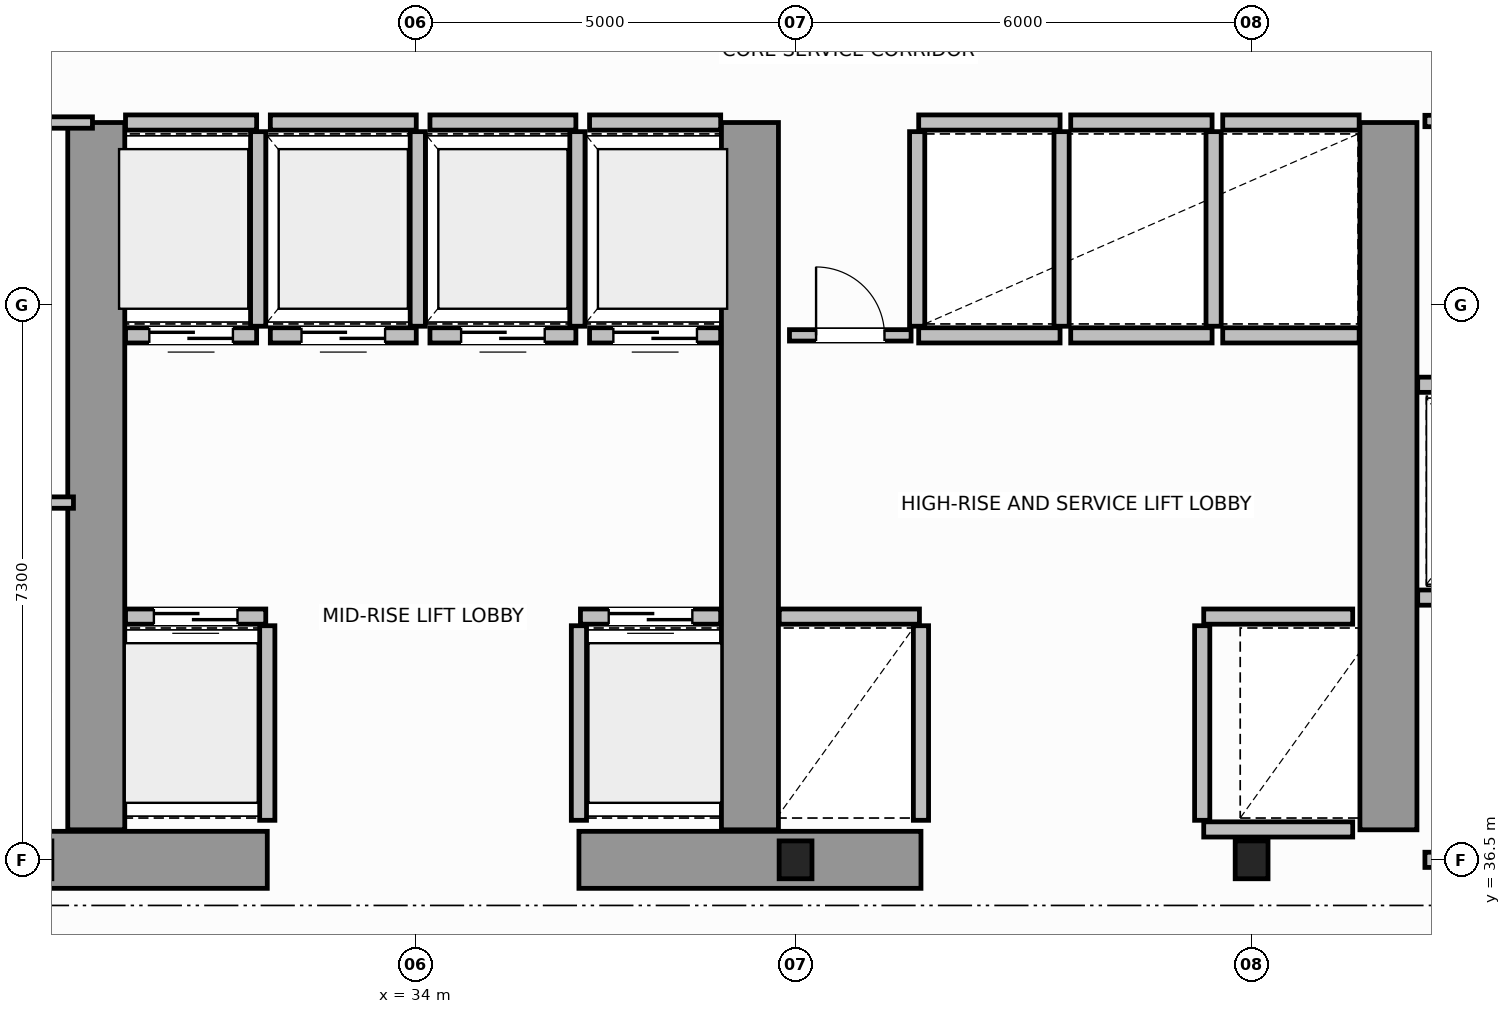
"""IFC4 building model, lengths in metres.
Left out: names, types, materials, properties, quantities, classifications, styles, units other than length and angle.
Written with IfcOpenShell. Run it as: python <this file> out.ifc"""

import sys

from ifc_helpers import new_model, si_unit, direction, frame, frame_2d, origin, origin_2d, place, context, subcontext, project, spatial, rectangle, i_section, extrude, source, transform, mapped, element, fill, save


model = new_model("IFC4")
c1 = context("Model", 3, precision=1e-05, world=origin(), true_north=direction((0.0, 1.0)))
c2 = subcontext(c1, "Body", "Model", "MODEL_VIEW")
j1 = project(units=[si_unit("LENGTHUNIT", "METRE"), si_unit("PLANEANGLEUNIT", "RADIAN")], contexts=[c1])
p1 = place(None, origin())
s1 = spatial("IfcSite", under=j1, at=p1, CompositionType="ELEMENT")
p2 = place(p1, origin())
s2 = spatial("IfcBuilding", under=s1, at=p2, CompositionType="ELEMENT")
p3 = place(p2, frame((0.0, 0.0, 165.2)))
s3 = spatial("IfcBuildingStorey", under=s2, at=p3, CompositionType="ELEMENT", Elevation=165.2)
m1 = source(origin(), c2, "Body", "SweptSolid", [
    extrude(i_section(OverallWidth=0.432, OverallDepth=0.498, WebThickness=0.055, FlangeThickness=0.068, FilletRadius=0.015, at=origin_2d()), origin(), (0.0, 0.0, 1.0), 3.8),
])
for number, where, z_axis, x_axis in (
    (1, (39.0, 36.5, 0.0), (0.0, 0.0, 1.0), (1.0, 0.0, 0.0)),
    (2, (45.0, 36.5, 0.0), (0.0, 0.0, 1.0), (1.0, 0.0, 0.0)),
):
    element("IfcColumn", number, at=place(p3, frame(where, z_axis=z_axis, x_axis=x_axis)), inside=s3, PredefinedType="COLUMN", context=c2, shape_type="MappedRepresentation", body=[
        mapped(m1, transform((0.0, 0.0, 0.0), scale=1.0)),
    ])
for number, where, z_axis, x_axis in (
    (3, (27.55, 36.5, 0.0), (0.0, 0.0, 1.0), (1.0, 0.0, 0.0)),
    (4, (36.15, 36.5, 0.0), (0.0, 0.0, 1.0), (1.0, 0.0, 0.0)),
):
    element("IfcWall", number, at=place(p3, frame(where, z_axis=z_axis, x_axis=x_axis)), inside=s3, PredefinedType="SHEAR", context=c2, shape_type="SweptSolid", body=[
        extrude(rectangle(XDim=4.5, YDim=0.75, at=frame_2d((2.25, 0.0))), origin(), (0.0, 0.0, 1.0), 3.8),
    ])
for number, where, z_axis, x_axis in (
    (5, (29.8, 36.895, 0.0), (0.0, 0.0, 1.0), (0.0, 1.0, 0.0)),
    (6, (38.4, 36.895, 0.0), (0.0, 0.0, 1.0), (0.0, 1.0, 0.0)),
    (7, (46.8, 36.895, 0.0), (0.0, 0.0, 1.0), (0.0, 1.0, 0.0)),
):
    element("IfcWall", number, at=place(p3, frame(where, z_axis=z_axis, x_axis=x_axis)), inside=s3, PredefinedType="SHEAR", context=c2, shape_type="SweptSolid", body=[
        extrude(rectangle(XDim=9.305, YDim=0.75, at=frame_2d((4.652, 0.0))), origin(), (0.0, 0.0, 1.0), 3.8),
    ])
p4 = place(p3, frame((47.28, 36.5, 0.0), z_axis=(0.0, 0.0, 1.0), x_axis=(1.0, 0.0, 0.0)))
e8 = element("IfcWall", 8, at=p4, inside=s3, PredefinedType="SOLIDWALL", context=c2, shape_type="SweptSolid", body=[
    extrude(rectangle(XDim=2.47, YDim=0.2, at=frame_2d((1.235, 0.0))), origin(), (0.0, 0.0, 1.0), 2.37),
])
p5 = place(p4, frame((0.65, 0.0, 0.0)))
e9 = element("IfcOpeningElement", 9, at=p5, cuts=e8, PredefinedType="OPENING", context=c2, shape_type="SweptSolid", body=[
    extrude(rectangle(XDim=1.1, YDim=2.15, at=frame_2d((0.55, 1.075))), frame((0.0, 0.11, 0.0), z_axis=(0.0, -1.0, 0.0), x_axis=(1.0, 0.0, 0.0)), (0.0, 0.0, 1.0), 0.22),
])
p6 = place(p3, frame((30.185, 39.7, 0.0), z_axis=(0.0, 0.0, 1.0), x_axis=(1.0, 0.0, 0.0)))
e10 = element("IfcWall", 10, at=p6, inside=s3, PredefinedType="SOLIDWALL", context=c2, shape_type="SweptSolid", body=[
    extrude(rectangle(XDim=1.845, YDim=0.2, at=frame_2d((0.922, 0.0))), origin(), (0.0, 0.0, 1.0), 3.58),
])
p7 = place(p6, frame((0.373, 0.0, 0.0)))
e11 = element("IfcOpeningElement", 11, at=p7, cuts=e10, PredefinedType="OPENING", context=c2, shape_type="SweptSolid", body=[
    extrude(rectangle(XDim=1.1, YDim=2.15, at=frame_2d((0.55, 1.075))), frame((0.0, 0.11, 0.0), z_axis=(0.0, -1.0, 0.0), x_axis=(1.0, 0.0, 0.0)), (0.0, 0.0, 1.0), 0.22),
])
p8 = place(p3, frame((32.05, 37.02, 0.0), z_axis=(0.0, 0.0, 1.0), x_axis=(0.0, 1.0, 0.0)))
e12 = element("IfcWall", 12, at=p8, inside=s3, PredefinedType="SOLIDWALL", context=c2, shape_type="SweptSolid", body=[
    extrude(rectangle(XDim=2.56, YDim=0.2, at=frame_2d((1.28, 0.0))), origin(), (0.0, 0.0, 1.0), 3.58),
])
p9 = place(p3, frame((36.17, 39.7, 0.0), z_axis=(0.0, 0.0, 1.0), x_axis=(1.0, 0.0, 0.0)))
e13 = element("IfcWall", 13, at=p9, inside=s3, PredefinedType="SOLIDWALL", context=c2, shape_type="SweptSolid", body=[
    extrude(rectangle(XDim=1.845, YDim=0.2, at=frame_2d((0.922, 0.0))), origin(), (0.0, 0.0, 1.0), 3.58),
])
p10 = place(p9, frame((0.372, 0.0, 0.0)))
e14 = element("IfcOpeningElement", 14, at=p10, cuts=e13, PredefinedType="OPENING", context=c2, shape_type="SweptSolid", body=[
    extrude(rectangle(XDim=1.1, YDim=2.15, at=frame_2d((0.55, 1.075))), frame((0.0, 0.11, 0.0), z_axis=(0.0, -1.0, 0.0), x_axis=(1.0, 0.0, 0.0)), (0.0, 0.0, 1.0), 0.22),
])
p11 = place(p3, frame((36.15, 37.02, 0.0), z_axis=(0.0, 0.0, 1.0), x_axis=(0.0, 1.0, 0.0)))
e15 = element("IfcWall", 15, at=p11, inside=s3, PredefinedType="SOLIDWALL", context=c2, shape_type="SweptSolid", body=[
    extrude(rectangle(XDim=2.56, YDim=0.2, at=frame_2d((1.28, 0.0))), origin(), (0.0, 0.0, 1.0), 3.58),
])
p12 = place(p3, frame((30.185, 43.4, 0.0), z_axis=(0.0, 0.0, 1.0), x_axis=(1.0, 0.0, 0.0)))
e16 = element("IfcWall", 16, at=p12, inside=s3, PredefinedType="SOLIDWALL", context=c2, shape_type="SweptSolid", body=[
    extrude(rectangle(XDim=1.725, YDim=0.2, at=frame_2d((0.862, 0.0))), origin(), (0.0, 0.0, 1.0), 3.58),
])
p13 = place(p12, frame((0.313, 0.0, 0.0)))
e17 = element("IfcOpeningElement", 17, at=p13, cuts=e16, PredefinedType="OPENING", context=c2, shape_type="SweptSolid", body=[
    extrude(rectangle(XDim=1.1, YDim=2.15, at=frame_2d((0.55, 1.075))), frame((0.0, 0.11, 0.0), z_axis=(0.0, -1.0, 0.0), x_axis=(1.0, 0.0, 0.0)), (0.0, 0.0, 1.0), 0.22),
])
p14 = place(p3, frame((30.185, 46.2, 0.0), z_axis=(0.0, 0.0, 1.0), x_axis=(1.0, 0.0, 0.0)))
e18 = element("IfcWall", 18, at=p14, inside=s3, PredefinedType="SOLIDWALL", context=c2, shape_type="SweptSolid", body=[
    extrude(rectangle(XDim=1.725, YDim=0.2, at=frame_2d((0.862, 0.0))), origin(), (0.0, 0.0, 1.0), 3.58),
])
p15 = place(p3, frame((31.93, 43.52, 0.0), z_axis=(0.0, 0.0, 1.0), x_axis=(0.0, 1.0, 0.0)))
e19 = element("IfcWall", 19, at=p15, inside=s3, PredefinedType="SOLIDWALL", context=c2, shape_type="SweptSolid", body=[
    extrude(rectangle(XDim=2.56, YDim=0.2, at=frame_2d((1.28, 0.0))), origin(), (0.0, 0.0, 1.0), 3.58),
])
p16 = place(p3, frame((32.09, 43.4, 0.0), z_axis=(0.0, 0.0, 1.0), x_axis=(1.0, 0.0, 0.0)))
e20 = element("IfcWall", 20, at=p16, inside=s3, PredefinedType="SOLIDWALL", context=c2, shape_type="SweptSolid", body=[
    extrude(rectangle(XDim=1.92, YDim=0.2, at=frame_2d((0.96, 0.0))), origin(), (0.0, 0.0, 1.0), 3.58),
])
p17 = place(p16, frame((0.41, 0.0, 0.0)))
e21 = element("IfcOpeningElement", 21, at=p17, cuts=e20, PredefinedType="OPENING", context=c2, shape_type="SweptSolid", body=[
    extrude(rectangle(XDim=1.1, YDim=2.15, at=frame_2d((0.55, 1.075))), frame((0.0, 0.11, 0.0), z_axis=(0.0, -1.0, 0.0), x_axis=(1.0, 0.0, 0.0)), (0.0, 0.0, 1.0), 0.22),
])
p18 = place(p3, frame((32.09, 46.2, 0.0), z_axis=(0.0, 0.0, 1.0), x_axis=(1.0, 0.0, 0.0)))
e22 = element("IfcWall", 22, at=p18, inside=s3, PredefinedType="SOLIDWALL", context=c2, shape_type="SweptSolid", body=[
    extrude(rectangle(XDim=1.92, YDim=0.2, at=frame_2d((0.96, 0.0))), origin(), (0.0, 0.0, 1.0), 3.58),
])
p19 = place(p3, frame((34.03, 43.52, 0.0), z_axis=(0.0, 0.0, 1.0), x_axis=(0.0, 1.0, 0.0)))
e23 = element("IfcWall", 23, at=p19, inside=s3, PredefinedType="SOLIDWALL", context=c2, shape_type="SweptSolid", body=[
    extrude(rectangle(XDim=2.56, YDim=0.2, at=frame_2d((1.28, 0.0))), origin(), (0.0, 0.0, 1.0), 3.58),
])
p20 = place(p3, frame((34.19, 43.4, 0.0), z_axis=(0.0, 0.0, 1.0), x_axis=(1.0, 0.0, 0.0)))
e24 = element("IfcWall", 24, at=p20, inside=s3, PredefinedType="SOLIDWALL", context=c2, shape_type="SweptSolid", body=[
    extrude(rectangle(XDim=1.92, YDim=0.2, at=frame_2d((0.96, 0.0))), origin(), (0.0, 0.0, 1.0), 3.58),
])
p21 = place(p20, frame((0.41, 0.0, 0.0)))
e25 = element("IfcOpeningElement", 25, at=p21, cuts=e24, PredefinedType="OPENING", context=c2, shape_type="SweptSolid", body=[
    extrude(rectangle(XDim=1.1, YDim=2.15, at=frame_2d((0.55, 1.075))), frame((0.0, 0.11, 0.0), z_axis=(0.0, -1.0, 0.0), x_axis=(1.0, 0.0, 0.0)), (0.0, 0.0, 1.0), 0.22),
])
p22 = place(p3, frame((34.19, 46.2, 0.0), z_axis=(0.0, 0.0, 1.0), x_axis=(1.0, 0.0, 0.0)))
e26 = element("IfcWall", 26, at=p22, inside=s3, PredefinedType="SOLIDWALL", context=c2, shape_type="SweptSolid", body=[
    extrude(rectangle(XDim=1.92, YDim=0.2, at=frame_2d((0.96, 0.0))), origin(), (0.0, 0.0, 1.0), 3.58),
])
p23 = place(p3, frame((36.13, 43.52, 0.0), z_axis=(0.0, 0.0, 1.0), x_axis=(0.0, 1.0, 0.0)))
e27 = element("IfcWall", 27, at=p23, inside=s3, PredefinedType="SOLIDWALL", context=c2, shape_type="SweptSolid", body=[
    extrude(rectangle(XDim=2.56, YDim=0.2, at=frame_2d((1.28, 0.0))), origin(), (0.0, 0.0, 1.0), 3.58),
])
p24 = place(p3, frame((36.29, 43.4, 0.0), z_axis=(0.0, 0.0, 1.0), x_axis=(1.0, 0.0, 0.0)))
e28 = element("IfcWall", 28, at=p24, inside=s3, PredefinedType="SOLIDWALL", context=c2, shape_type="SweptSolid", body=[
    extrude(rectangle(XDim=1.725, YDim=0.2, at=frame_2d((0.862, 0.0))), origin(), (0.0, 0.0, 1.0), 3.58),
])
p25 = place(p24, frame((0.313, 0.0, 0.0)))
e29 = element("IfcOpeningElement", 29, at=p25, cuts=e28, PredefinedType="OPENING", context=c2, shape_type="SweptSolid", body=[
    extrude(rectangle(XDim=1.1, YDim=2.15, at=frame_2d((0.55, 1.075))), frame((0.0, 0.11, 0.0), z_axis=(0.0, -1.0, 0.0), x_axis=(1.0, 0.0, 0.0)), (0.0, 0.0, 1.0), 0.22),
])
p26 = place(p3, frame((36.29, 46.2, 0.0), z_axis=(0.0, 0.0, 1.0), x_axis=(1.0, 0.0, 0.0)))
e30 = element("IfcWall", 30, at=p26, inside=s3, PredefinedType="SOLIDWALL", context=c2, shape_type="SweptSolid", body=[
    extrude(rectangle(XDim=1.725, YDim=0.2, at=frame_2d((0.862, 0.0))), origin(), (0.0, 0.0, 1.0), 3.58),
])
p27 = place(p3, frame((38.785, 39.7, 0.0), z_axis=(0.0, 0.0, 1.0), x_axis=(1.0, 0.0, 0.0)))
e31 = element("IfcWall", 31, at=p27, inside=s3, PredefinedType="SOLIDWALL", context=c2, shape_type="SweptSolid", body=[
    extrude(rectangle(XDim=1.845, YDim=0.2, at=frame_2d((0.922, 0.0))), origin(), (0.0, 0.0, 1.0), 3.58),
])
p28 = place(p3, frame((40.65, 37.02, 0.0), z_axis=(0.0, 0.0, 1.0), x_axis=(0.0, 1.0, 0.0)))
e32 = element("IfcWall", 32, at=p28, inside=s3, PredefinedType="SOLIDWALL", context=c2, shape_type="SweptSolid", body=[
    extrude(rectangle(XDim=2.56, YDim=0.2, at=frame_2d((1.28, 0.0))), origin(), (0.0, 0.0, 1.0), 3.58),
])
p29 = place(p3, frame((44.37, 39.7, 0.0), z_axis=(0.0, 0.0, 1.0), x_axis=(1.0, 0.0, 0.0)))
e33 = element("IfcWall", 33, at=p29, inside=s3, PredefinedType="SOLIDWALL", context=c2, shape_type="SweptSolid", body=[
    extrude(rectangle(XDim=1.96, YDim=0.2, at=frame_2d((0.98, 0.0))), origin(), (0.0, 0.0, 1.0), 3.58),
])
p30 = place(p3, frame((44.37, 36.9, 0.0), z_axis=(0.0, 0.0, 1.0), x_axis=(1.0, 0.0, 0.0)))
e34 = element("IfcWall", 34, at=p30, inside=s3, PredefinedType="SOLIDWALL", context=c2, shape_type="SweptSolid", body=[
    extrude(rectangle(XDim=1.96, YDim=0.2, at=frame_2d((0.98, 0.0))), origin(), (0.0, 0.0, 1.0), 2.37),
])
p31 = place(p3, frame((44.35, 37.02, 0.0), z_axis=(0.0, 0.0, 1.0), x_axis=(0.0, 1.0, 0.0)))
e35 = element("IfcWall", 35, at=p31, inside=s3, PredefinedType="SOLIDWALL", context=c2, shape_type="SweptSolid", body=[
    extrude(rectangle(XDim=2.56, YDim=0.2, at=frame_2d((1.28, 0.0))), origin(), (0.0, 0.0, 1.0), 3.58),
])
for number, where, z_axis, x_axis in (
    (36, (40.62, 43.4, 0.0), (0.0, 0.0, 1.0), (1.0, 0.0, 0.0)),
    (37, (40.62, 46.2, 0.0), (0.0, 0.0, 1.0), (1.0, 0.0, 0.0)),
):
    element("IfcWall", number, at=place(p3, frame(where, z_axis=z_axis, x_axis=x_axis)), inside=s3, PredefinedType="SOLIDWALL", context=c2, shape_type="SweptSolid", body=[
        extrude(rectangle(XDim=1.86, YDim=0.2, at=frame_2d((0.93, 0.0))), origin(), (0.0, 0.0, 1.0), 3.58),
    ])
for number, where, z_axis, x_axis in (
    (38, (40.6, 43.52, 0.0), (0.0, 0.0, 1.0), (0.0, 1.0, 0.0)),
    (39, (42.5, 43.52, 0.0), (0.0, 0.0, 1.0), (0.0, 1.0, 0.0)),
):
    element("IfcWall", number, at=place(p3, frame(where, z_axis=z_axis, x_axis=x_axis)), inside=s3, PredefinedType="SOLIDWALL", context=c2, shape_type="SweptSolid", body=[
        extrude(rectangle(XDim=2.56, YDim=0.2, at=frame_2d((1.28, 0.0))), origin(), (0.0, 0.0, 1.0), 3.58),
    ])
for number, where, z_axis, x_axis in (
    (40, (42.62, 43.4, 0.0), (0.0, 0.0, 1.0), (1.0, 0.0, 0.0)),
    (41, (42.62, 46.2, 0.0), (0.0, 0.0, 1.0), (1.0, 0.0, 0.0)),
):
    element("IfcWall", number, at=place(p3, frame(where, z_axis=z_axis, x_axis=x_axis)), inside=s3, PredefinedType="SOLIDWALL", context=c2, shape_type="SweptSolid", body=[
        extrude(rectangle(XDim=1.86, YDim=0.2, at=frame_2d((0.93, 0.0))), origin(), (0.0, 0.0, 1.0), 3.58),
    ])
p32 = place(p3, frame((44.5, 43.52, 0.0), z_axis=(0.0, 0.0, 1.0), x_axis=(0.0, 1.0, 0.0)))
e42 = element("IfcWall", 42, at=p32, inside=s3, PredefinedType="SOLIDWALL", context=c2, shape_type="SweptSolid", body=[
    extrude(rectangle(XDim=2.56, YDim=0.2, at=frame_2d((1.28, 0.0))), origin(), (0.0, 0.0, 1.0), 3.58),
])
for number, where, z_axis, x_axis in (
    (43, (44.62, 43.4, 0.0), (0.0, 0.0, 1.0), (1.0, 0.0, 0.0)),
    (44, (44.62, 46.2, 0.0), (0.0, 0.0, 1.0), (1.0, 0.0, 0.0)),
):
    element("IfcWall", number, at=place(p3, frame(where, z_axis=z_axis, x_axis=x_axis)), inside=s3, PredefinedType="SOLIDWALL", context=c2, shape_type="SweptSolid", body=[
        extrude(rectangle(XDim=1.795, YDim=0.2, at=frame_2d((0.897, 0.0))), origin(), (0.0, 0.0, 1.0), 3.58),
    ])
p33 = place(p3, frame((47.185, 39.95, 0.0), z_axis=(0.0, 0.0, 1.0), x_axis=(1.0, 0.0, 0.0)))
e45 = element("IfcWall", 45, at=p33, inside=s3, PredefinedType="SOLIDWALL", context=c2, shape_type="SweptSolid", body=[
    extrude(rectangle(XDim=2.145, YDim=0.2, at=frame_2d((1.073, 0.0))), origin(), (0.0, 0.0, 1.0), 3.58),
])
p34 = place(p33, frame((0.522, 0.0, 0.0)))
e46 = element("IfcOpeningElement", 46, at=p34, cuts=e45, PredefinedType="OPENING", context=c2, shape_type="SweptSolid", body=[
    extrude(rectangle(XDim=1.1, YDim=2.15, at=frame_2d((0.55, 1.075))), frame((0.0, 0.11, 0.0), z_axis=(0.0, -1.0, 0.0), x_axis=(1.0, 0.0, 0.0)), (0.0, 0.0, 1.0), 0.22),
])
p35 = place(p3, frame((47.185, 42.75, 0.0), z_axis=(0.0, 0.0, 1.0), x_axis=(1.0, 0.0, 0.0)))
e47 = element("IfcWall", 47, at=p35, inside=s3, PredefinedType="SOLIDWALL", context=c2, shape_type="SweptSolid", body=[
    extrude(rectangle(XDim=2.145, YDim=0.2, at=frame_2d((1.073, 0.0))), origin(), (0.0, 0.0, 1.0), 3.58),
])
p36 = place(p3, frame((21.25, 46.2, 0.0), z_axis=(0.0, 0.0, 1.0), x_axis=(1.0, 0.0, 0.0)))
e48 = element("IfcWall", 48, at=p36, inside=s3, PredefinedType="PARTITIONING", context=c2, shape_type="SweptSolid", body=[
    extrude(rectangle(XDim=8.5, YDim=0.15, at=frame_2d((4.25, 0.0))), origin(), (0.0, 0.0, 1.0), 3.58),
])
p37 = place(p3, frame((21.5, 41.2, 0.0), z_axis=(0.0, 0.0, 1.0), x_axis=(1.0, 0.0, 0.0)))
e49 = element("IfcWall", 49, at=p37, inside=s3, PredefinedType="PARTITIONING", context=c2, shape_type="SweptSolid", body=[
    extrude(rectangle(XDim=8.0, YDim=0.15, at=frame_2d((4.0, 0.0))), origin(), (0.0, 0.0, 1.0), 3.58),
])
p38 = place(p37, frame((3.4, 0.0, 0.0)))
e50 = element("IfcOpeningElement", 50, at=p38, cuts=e49, PredefinedType="OPENING", context=c2, shape_type="SweptSolid", body=[
    extrude(rectangle(XDim=0.9, YDim=2.1, at=frame_2d((0.45, 1.05))), frame((0.0, 0.085, 0.0), z_axis=(0.0, -1.0, 0.0), x_axis=(1.0, 0.0, 0.0)), (0.0, 0.0, 1.0), 0.17),
])
p39 = place(p3, frame((47.28, 46.22, 0.0), z_axis=(0.0, 0.0, 1.0), x_axis=(1.0, 0.0, 0.0)))
e51 = element("IfcWall", 51, at=p39, inside=s3, PredefinedType="PARTITIONING", context=c2, shape_type="SweptSolid", body=[
    extrude(rectangle(XDim=2.1, YDim=0.15, at=frame_2d((1.05, 0.0))), origin(), (0.0, 0.0, 1.0), 3.58),
])
p40 = place(p39, frame((0.55, 0.0, 0.0)))
e52 = element("IfcOpeningElement", 52, at=p40, cuts=e51, PredefinedType="OPENING", context=c2, shape_type="SweptSolid", body=[
    extrude(rectangle(XDim=0.9, YDim=2.1, at=frame_2d((0.45, 1.05))), frame((0.0, 0.085, 0.0), z_axis=(0.0, -1.0, 0.0), x_axis=(1.0, 0.0, 0.0)), (0.0, 0.0, 1.0), 0.17),
])
p41 = place(p3, frame((38.92, 43.4, 0.0), z_axis=(0.0, 0.0, 1.0), x_axis=(1.0, 0.0, 0.0)))
e53 = element("IfcWall", 53, at=p41, inside=s3, PredefinedType="PARTITIONING", context=c2, shape_type="SweptSolid", body=[
    extrude(rectangle(XDim=1.6, YDim=0.15, at=frame_2d((0.8, 0.0))), origin(), (0.0, 0.0, 1.0), 3.58),
])
p42 = place(p41, frame((0.35, 0.0, 0.0)))
e54 = element("IfcOpeningElement", 54, at=p42, cuts=e53, PredefinedType="OPENING", context=c2, shape_type="SweptSolid", body=[
    extrude(rectangle(XDim=0.9, YDim=2.1, at=frame_2d((0.45, 1.05))), frame((0.0, 0.085, 0.0), z_axis=(0.0, -1.0, 0.0), x_axis=(1.0, 0.0, 0.0)), (0.0, 0.0, 1.0), 0.17),
])
m2 = source(origin(), c2, "Body", "SweptSolid", [
    extrude(rectangle(XDim=1.1, YDim=2.15, at=frame_2d((0.55, 1.075))), frame((0.0, 0.025, 0.0), z_axis=(0.0, -1.0, 0.0), x_axis=(1.0, 0.0, 0.0)), (0.0, 0.0, 1.0), 0.05),
])
p43 = place(p7, origin())
e55 = element("IfcDoor", 55, at=p43, inside=s3, OperationType="DOUBLE_DOOR_SLIDING", PredefinedType="DOOR", context=c2, shape_type="MappedRepresentation", body=[
    mapped(m2, transform((0.0, 0.0, 0.0), scale=1.0)),
])
fill(e11, e55)
p44 = place(p10, origin())
e56 = element("IfcDoor", 56, at=p44, inside=s3, OperationType="DOUBLE_DOOR_SLIDING", PredefinedType="DOOR", context=c2, shape_type="MappedRepresentation", body=[
    mapped(m2, transform((0.0, 0.0, 0.0), scale=1.0)),
])
fill(e14, e56)
p45 = place(p13, origin())
e57 = element("IfcDoor", 57, at=p45, inside=s3, OperationType="DOUBLE_DOOR_SLIDING", PredefinedType="DOOR", context=c2, shape_type="MappedRepresentation", body=[
    mapped(m2, transform((0.0, 0.0, 0.0), scale=1.0)),
])
fill(e17, e57)
p46 = place(p17, origin())
e58 = element("IfcDoor", 58, at=p46, inside=s3, OperationType="DOUBLE_DOOR_SLIDING", PredefinedType="DOOR", context=c2, shape_type="MappedRepresentation", body=[
    mapped(m2, transform((0.0, 0.0, 0.0), scale=1.0)),
])
fill(e21, e58)
p47 = place(p21, origin())
e59 = element("IfcDoor", 59, at=p47, inside=s3, OperationType="DOUBLE_DOOR_SLIDING", PredefinedType="DOOR", context=c2, shape_type="MappedRepresentation", body=[
    mapped(m2, transform((0.0, 0.0, 0.0), scale=1.0)),
])
fill(e25, e59)
p48 = place(p25, origin())
e60 = element("IfcDoor", 60, at=p48, inside=s3, OperationType="DOUBLE_DOOR_SLIDING", PredefinedType="DOOR", context=c2, shape_type="MappedRepresentation", body=[
    mapped(m2, transform((0.0, 0.0, 0.0), scale=1.0)),
])
fill(e29, e60)
m3 = source(origin(), c2, "Body", "SweptSolid", [
    extrude(rectangle(XDim=0.9, YDim=2.1, at=frame_2d((0.45, 1.05))), frame((0.0, 0.025, 0.0), z_axis=(0.0, -1.0, 0.0), x_axis=(1.0, 0.0, 0.0)), (0.0, 0.0, 1.0), 0.05),
])
p49 = place(p42, origin())
e61 = element("IfcDoor", 61, at=p49, inside=s3, OperationType="SINGLE_SWING_LEFT", PredefinedType="DOOR", context=c2, shape_type="MappedRepresentation", body=[
    mapped(m3, transform((0.0, 0.0, 0.0), scale=1.0)),
])
fill(e54, e61)
save(model, sys.argv[1])
